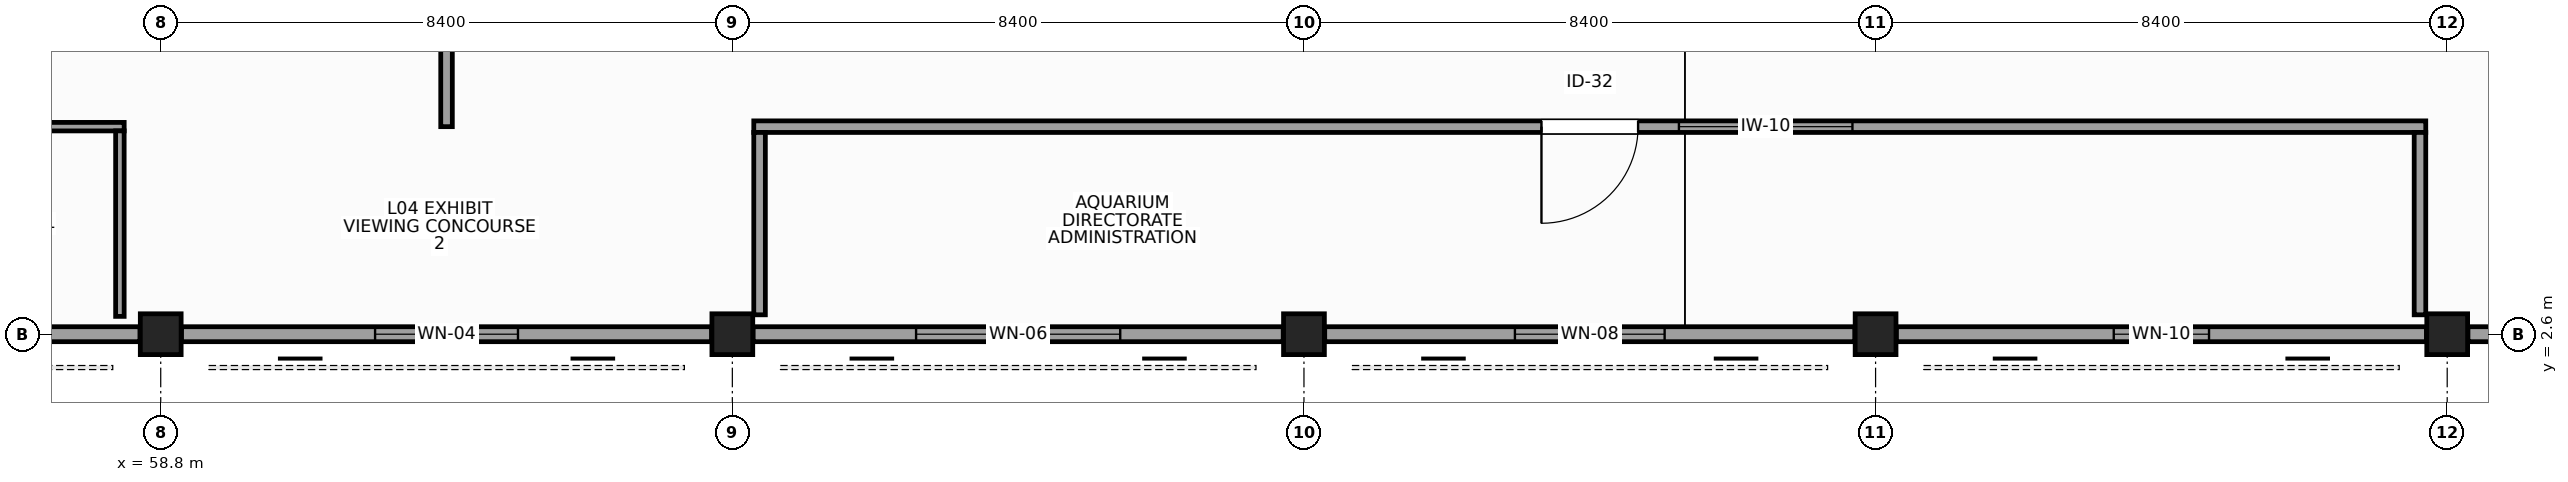
"""IFC4 building model, lengths in metres.
Left out: names, types, materials, properties, quantities, classifications, styles, units other than length and angle.
Written with IfcOpenShell. Run it as: python <this file> out.ifc"""

import sys

from ifc_helpers import new_model, si_unit, direction, frame, frame_2d, origin, origin_2d, place, context, subcontext, project, spatial, rectangle, extrude, element, fill, save


model = new_model("IFC4")
c1 = context("Model", 3, precision=1e-05, world=origin(), true_north=direction((0.0, 1.0)))
c2 = subcontext(c1, "Body", "Model", "MODEL_VIEW")
j1 = project(units=[si_unit("LENGTHUNIT", "METRE"), si_unit("PLANEANGLEUNIT", "RADIAN")], contexts=[c1])
p1 = place(None, origin())
s1 = spatial("IfcSite", under=j1, at=p1, CompositionType="ELEMENT")
p2 = place(p1, origin())
s2 = spatial("IfcBuilding", under=s1, at=p2, CompositionType="ELEMENT")
p3 = place(p2, frame((0.0, 0.0, 20.1)))
s3 = spatial("IfcBuildingStorey", under=s2, at=p3, CompositionType="ELEMENT", Elevation=20.1)
for number, where, z_axis, x_axis in (
    (1, (58.8, 2.6, 0.0), (0.0, 0.0, 1.0), (1.0, 0.0, 0.0)),
    (2, (67.2, 2.6, 0.0), (0.0, 0.0, 1.0), (1.0, 0.0, 0.0)),
    (3, (75.6, 2.6, 0.0), (0.0, 0.0, 1.0), (1.0, 0.0, 0.0)),
    (4, (84.0, 2.6, 0.0), (0.0, 0.0, 1.0), (1.0, 0.0, 0.0)),
    (5, (92.4, 2.6, 0.0), (0.0, 0.0, 1.0), (1.0, 0.0, 0.0)),
):
    element("IfcColumn", number, at=place(p3, frame(where, z_axis=z_axis, x_axis=x_axis)), inside=s3, PredefinedType="COLUMN", context=c2, shape_type="SweptSolid", body=[
        extrude(rectangle(XDim=0.6, YDim=0.6, at=origin_2d()), origin(), (0.0, 0.0, 1.0), 4.5),
    ])
p4 = place(p3, frame((50.705, 2.6, 0.0), z_axis=(0.0, 0.0, 1.0), x_axis=(1.0, 0.0, 0.0)))
e6 = element("IfcWall", 6, at=p4, inside=s3, PredefinedType="STANDARD", context=c2, shape_type="SweptSolid", body=[
    extrude(rectangle(XDim=7.79, YDim=0.22, at=frame_2d((3.895, 0.0))), origin(), (0.0, 0.0, 1.0), 4.2),
])
p5 = place(p4, frame((2.695, 0.0, 0.95)))
e7 = element("IfcOpeningElement", 7, at=p5, cuts=e6, PredefinedType="OPENING", context=c2, shape_type="SweptSolid", body=[
    extrude(rectangle(XDim=2.4, YDim=2.4, at=frame_2d((1.2, 1.2))), frame((0.0, 0.12, 0.0), z_axis=(0.0, -1.0, 0.0), x_axis=(1.0, 0.0, 0.0)), (0.0, 0.0, 1.0), 0.24),
])
p6 = place(p3, frame((59.105, 2.6, 0.0), z_axis=(0.0, 0.0, 1.0), x_axis=(1.0, 0.0, 0.0)))
e8 = element("IfcWall", 8, at=p6, inside=s3, PredefinedType="STANDARD", context=c2, shape_type="SweptSolid", body=[
    extrude(rectangle(XDim=7.79, YDim=0.22, at=frame_2d((3.895, 0.0))), origin(), (0.0, 0.0, 1.0), 4.2),
])
p7 = place(p6, frame((2.845, 0.0, 0.95)))
e9 = element("IfcOpeningElement", 9, at=p7, cuts=e8, PredefinedType="OPENING", context=c2, shape_type="SweptSolid", body=[
    extrude(rectangle(XDim=2.1, YDim=2.1, at=frame_2d((1.05, 1.05))), frame((0.0, 0.12, 0.0), z_axis=(0.0, -1.0, 0.0), x_axis=(1.0, 0.0, 0.0)), (0.0, 0.0, 1.0), 0.24),
])
p8 = place(p3, frame((67.505, 2.6, 0.0), z_axis=(0.0, 0.0, 1.0), x_axis=(1.0, 0.0, 0.0)))
e10 = element("IfcWall", 10, at=p8, inside=s3, PredefinedType="STANDARD", context=c2, shape_type="SweptSolid", body=[
    extrude(rectangle(XDim=7.79, YDim=0.22, at=frame_2d((3.895, 0.0))), origin(), (0.0, 0.0, 1.0), 4.2),
])
p9 = place(p8, frame((2.395, 0.0, 0.95)))
e11 = element("IfcOpeningElement", 11, at=p9, cuts=e10, PredefinedType="OPENING", context=c2, shape_type="SweptSolid", body=[
    extrude(rectangle(XDim=3.0, YDim=1.8, at=frame_2d((1.5, 0.9))), frame((0.0, 0.12, 0.0), z_axis=(0.0, -1.0, 0.0), x_axis=(1.0, 0.0, 0.0)), (0.0, 0.0, 1.0), 0.24),
])
p10 = place(p3, frame((75.905, 2.6, 0.0), z_axis=(0.0, 0.0, 1.0), x_axis=(1.0, 0.0, 0.0)))
e12 = element("IfcWall", 12, at=p10, inside=s3, PredefinedType="STANDARD", context=c2, shape_type="SweptSolid", body=[
    extrude(rectangle(XDim=7.79, YDim=0.22, at=frame_2d((3.895, 0.0))), origin(), (0.0, 0.0, 1.0), 4.2),
])
p11 = place(p10, frame((2.795, 0.0, 0.95)))
e13 = element("IfcOpeningElement", 13, at=p11, cuts=e12, PredefinedType="OPENING", context=c2, shape_type="SweptSolid", body=[
    extrude(rectangle(XDim=2.2, YDim=1.9, at=frame_2d((1.1, 0.95))), frame((0.0, 0.12, 0.0), z_axis=(0.0, -1.0, 0.0), x_axis=(1.0, 0.0, 0.0)), (0.0, 0.0, 1.0), 0.24),
])
p12 = place(p3, frame((84.305, 2.6, 0.0), z_axis=(0.0, 0.0, 1.0), x_axis=(1.0, 0.0, 0.0)))
e14 = element("IfcWall", 14, at=p12, inside=s3, PredefinedType="STANDARD", context=c2, shape_type="SweptSolid", body=[
    extrude(rectangle(XDim=7.79, YDim=0.22, at=frame_2d((3.895, 0.0))), origin(), (0.0, 0.0, 1.0), 4.2),
])
p13 = place(p12, frame((3.195, 0.0, 0.95)))
e15 = element("IfcOpeningElement", 15, at=p13, cuts=e14, PredefinedType="OPENING", context=c2, shape_type="SweptSolid", body=[
    extrude(rectangle(XDim=1.4, YDim=1.6, at=frame_2d((0.7, 0.8))), frame((0.0, 0.12, 0.0), z_axis=(0.0, -1.0, 0.0), x_axis=(1.0, 0.0, 0.0)), (0.0, 0.0, 1.0), 0.24),
])
p14 = place(p3, frame((92.705, 2.6, 0.0), z_axis=(0.0, 0.0, 1.0), x_axis=(1.0, 0.0, 0.0)))
e16 = element("IfcWall", 16, at=p14, inside=s3, PredefinedType="STANDARD", context=c2, shape_type="SweptSolid", body=[
    extrude(rectangle(XDim=7.79, YDim=0.22, at=frame_2d((3.895, 0.0))), origin(), (0.0, 0.0, 1.0), 4.2),
])
p15 = place(p14, frame((2.595, 0.0, 0.95)))
e17 = element("IfcOpeningElement", 17, at=p15, cuts=e16, PredefinedType="OPENING", context=c2, shape_type="SweptSolid", body=[
    extrude(rectangle(XDim=2.6, YDim=1.6, at=frame_2d((1.3, 0.8))), frame((0.0, 0.12, 0.0), z_axis=(0.0, -1.0, 0.0), x_axis=(1.0, 0.0, 0.0)), (0.0, 0.0, 1.0), 0.24),
])
p16 = place(p3, frame((63.0, 5.65, 0.0), z_axis=(0.0, 0.0, 1.0), x_axis=(0.0, 1.0, 0.0)))
e18 = element("IfcWall", 18, at=p16, inside=s3, PredefinedType="PARTITIONING", context=c2, shape_type="SweptSolid", body=[
    extrude(rectangle(XDim=6.5, YDim=0.17, at=frame_2d((3.25, 0.0))), origin(), (0.0, 0.0, 1.0), 3.75),
])
p17 = place(p16, frame((2.35, 0.0, 0.0)))
e19 = element("IfcOpeningElement", 19, at=p17, cuts=e18, PredefinedType="OPENING", context=c2, shape_type="SweptSolid", body=[
    extrude(rectangle(XDim=1.8, YDim=2.25, at=frame_2d((0.9, 1.125))), frame((0.0, 0.095, 0.0), z_axis=(0.0, -1.0, 0.0), x_axis=(1.0, 0.0, 0.0)), (0.0, 0.0, 1.0), 0.19),
])
p18 = place(p3, frame((33.938, 5.65, 0.0), z_axis=(0.0, 0.0, 1.0), x_axis=(1.0, 0.0, 0.0)))
e20 = element("IfcWall", 20, at=p18, inside=s3, PredefinedType="PARTITIONING", context=c2, shape_type="SweptSolid", body=[
    extrude(rectangle(XDim=24.325, YDim=0.125, at=frame_2d((12.163, 0.0))), origin(), (0.0, 0.0, 1.0), 4.2),
])
p19 = place(p18, frame((11.303, 0.0, 0.0)))
e21 = element("IfcOpeningElement", 21, at=p19, cuts=e20, PredefinedType="OPENING", context=c2, shape_type="SweptSolid", body=[
    extrude(rectangle(XDim=1.72, YDim=2.35, at=frame_2d((0.86, 1.175))), frame((0.0, 0.073, 0.0), z_axis=(0.0, -1.0, 0.0), x_axis=(1.0, 0.0, 0.0)), (0.0, 0.0, 1.0), 0.145),
])
p20 = place(p18, frame((13.623, 0.0, 1.05)))
e22 = element("IfcOpeningElement", 22, at=p20, cuts=e20, PredefinedType="OPENING", context=c2, shape_type="SweptSolid", body=[
    extrude(rectangle(XDim=1.65, YDim=1.5, at=frame_2d((0.825, 0.75))), frame((0.0, 0.073, 0.0), z_axis=(0.0, -1.0, 0.0), x_axis=(1.0, 0.0, 0.0)), (0.0, 0.0, 1.0), 0.145),
])
p21 = place(p3, frame((58.2, 2.862, 0.0), z_axis=(0.0, 0.0, 1.0), x_axis=(0.0, 1.0, 0.0)))
e23 = element("IfcWall", 23, at=p21, inside=s3, PredefinedType="PARTITIONING", context=c2, shape_type="SweptSolid", body=[
    extrude(rectangle(XDim=2.726, YDim=0.125, at=frame_2d((1.363, 0.0))), origin(), (0.0, 0.0, 1.0), 4.2),
])
p22 = place(p3, frame((67.515, 5.65, 0.0), z_axis=(0.0, 0.0, 1.0), x_axis=(1.0, 0.0, 0.0)))
e24 = element("IfcWall", 24, at=p22, inside=s3, PredefinedType="PARTITIONING", context=c2, shape_type="SweptSolid", body=[
    extrude(rectangle(XDim=24.57, YDim=0.17, at=frame_2d((12.285, 0.0))), origin(), (0.0, 0.0, 1.0), 4.2),
])
p23 = place(p22, frame((11.575, 0.0, 0.0)))
e25 = element("IfcOpeningElement", 25, at=p23, cuts=e24, PredefinedType="OPENING", context=c2, shape_type="SweptSolid", body=[
    extrude(rectangle(XDim=1.42, YDim=2.38, at=frame_2d((0.71, 1.19))), frame((0.0, 0.095, 0.0), z_axis=(0.0, -1.0, 0.0), x_axis=(1.0, 0.0, 0.0)), (0.0, 0.0, 1.0), 0.19),
])
p24 = place(p22, frame((13.595, 0.0, 1.05)))
e26 = element("IfcOpeningElement", 26, at=p24, cuts=e24, PredefinedType="OPENING", context=c2, shape_type="SweptSolid", body=[
    extrude(rectangle(XDim=2.55, YDim=1.2, at=frame_2d((1.275, 0.6))), frame((0.0, 0.095, 0.0), z_axis=(0.0, -1.0, 0.0), x_axis=(1.0, 0.0, 0.0)), (0.0, 0.0, 1.0), 0.19),
])
for number, where, z_axis, x_axis in (
    (27, (92.0, 2.885, 0.0), (0.0, 0.0, 1.0), (0.0, 1.0, 0.0)),
    (28, (67.6, 2.885, 0.0), (0.0, 0.0, 1.0), (0.0, 1.0, 0.0)),
):
    element("IfcWall", number, at=place(p3, frame(where, z_axis=z_axis, x_axis=x_axis)), inside=s3, PredefinedType="PARTITIONING", context=c2, shape_type="SweptSolid", body=[
        extrude(rectangle(XDim=2.68, YDim=0.17, at=frame_2d((1.34, 0.0))), origin(), (0.0, 0.0, 1.0), 4.2),
    ])
p25 = place(p7, origin())
e29 = element("IfcWindow", 29, at=p25, inside=s3, PartitioningType="SINGLE_PANEL", PredefinedType="WINDOW", context=c2, shape_type="SweptSolid", body=[
    extrude(rectangle(XDim=2.1, YDim=2.1, at=frame_2d((1.05, 1.05))), frame((0.0, 0.03, 0.0), z_axis=(0.0, -1.0, 0.0), x_axis=(1.0, 0.0, 0.0)), (0.0, 0.0, 1.0), 0.06),
])
fill(e9, e29)
p26 = place(p9, origin())
e30 = element("IfcWindow", 30, at=p26, inside=s3, PartitioningType="SINGLE_PANEL", PredefinedType="WINDOW", context=c2, shape_type="SweptSolid", body=[
    extrude(rectangle(XDim=3.0, YDim=1.8, at=frame_2d((1.5, 0.9))), frame((0.0, 0.03, 0.0), z_axis=(0.0, -1.0, 0.0), x_axis=(1.0, 0.0, 0.0)), (0.0, 0.0, 1.0), 0.06),
])
fill(e11, e30)
p27 = place(p11, origin())
e31 = element("IfcWindow", 31, at=p27, inside=s3, PartitioningType="SINGLE_PANEL", PredefinedType="WINDOW", context=c2, shape_type="SweptSolid", body=[
    extrude(rectangle(XDim=2.2, YDim=1.9, at=frame_2d((1.1, 0.95))), frame((0.0, 0.03, 0.0), z_axis=(0.0, -1.0, 0.0), x_axis=(1.0, 0.0, 0.0)), (0.0, 0.0, 1.0), 0.06),
])
fill(e13, e31)
p28 = place(p13, origin())
e32 = element("IfcWindow", 32, at=p28, inside=s3, PartitioningType="SINGLE_PANEL", PredefinedType="WINDOW", context=c2, shape_type="SweptSolid", body=[
    extrude(rectangle(XDim=1.4, YDim=1.6, at=frame_2d((0.7, 0.8))), frame((0.0, 0.03, 0.0), z_axis=(0.0, -1.0, 0.0), x_axis=(1.0, 0.0, 0.0)), (0.0, 0.0, 1.0), 0.06),
])
fill(e15, e32)
p29 = place(p23, frame((1.42, 0.0, 0.0), z_axis=(0.0, 0.0, 1.0), x_axis=(-1.0, 0.0, 0.0)))
e33 = element("IfcDoor", 33, at=p29, inside=s3, OperationType="SINGLE_SWING_RIGHT", PredefinedType="DOOR", context=c2, shape_type="SweptSolid", body=[
    extrude(rectangle(XDim=1.42, YDim=2.38, at=frame_2d((0.71, 1.19))), frame((0.0, 0.025, 0.0), z_axis=(0.0, -1.0, 0.0), x_axis=(1.0, 0.0, 0.0)), (0.0, 0.0, 1.0), 0.05),
])
fill(e25, e33)
p30 = place(p24, origin())
e34 = element("IfcWindow", 34, at=p30, inside=s3, PartitioningType="SINGLE_PANEL", PredefinedType="WINDOW", context=c2, shape_type="SweptSolid", body=[
    extrude(rectangle(XDim=2.55, YDim=1.2, at=frame_2d((1.275, 0.6))), frame((0.0, 0.03, 0.0), z_axis=(0.0, -1.0, 0.0), x_axis=(1.0, 0.0, 0.0)), (0.0, 0.0, 1.0), 0.06),
])
fill(e26, e34)
save(model, sys.argv[1])
